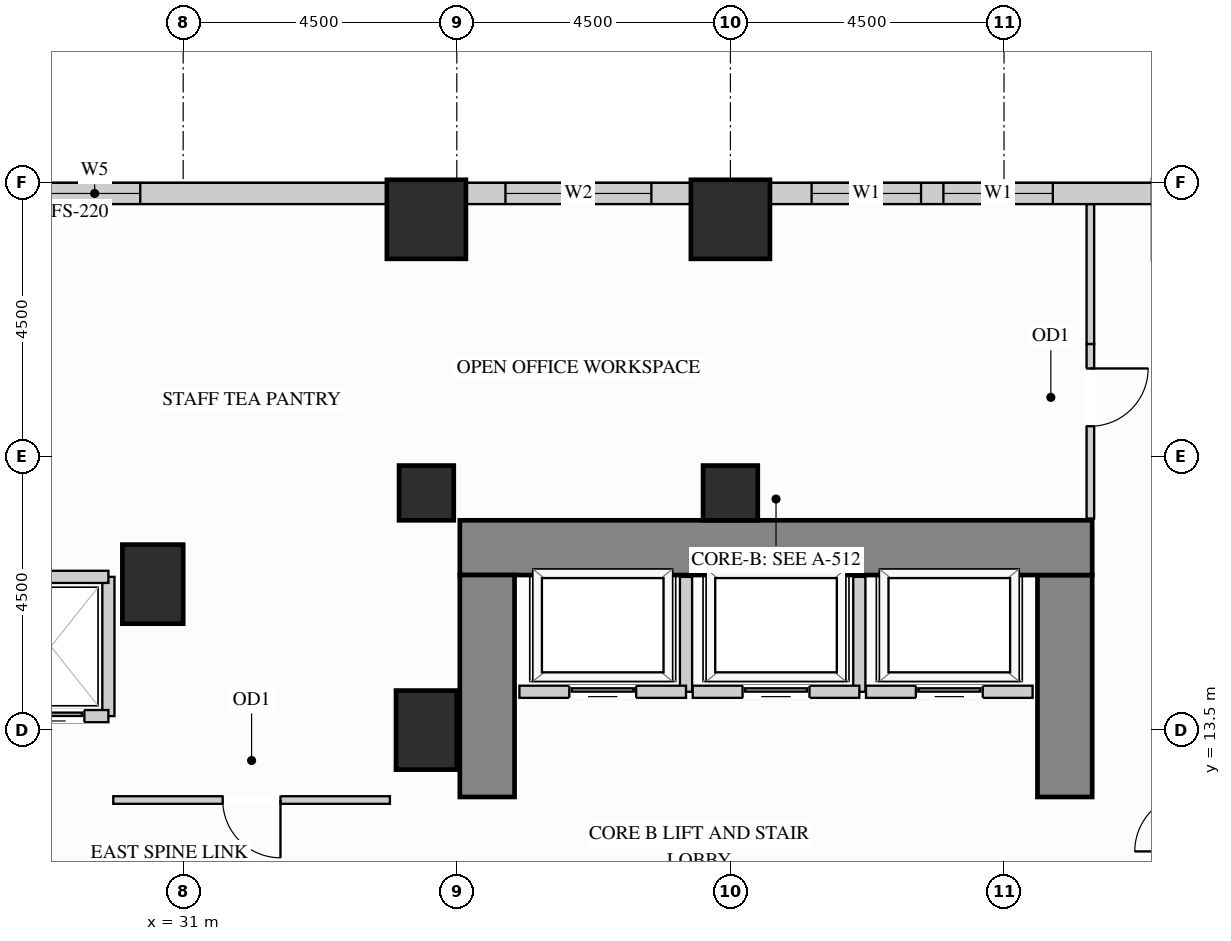
"""IFC4 building model, lengths in metres.
Left out: names, types, materials, properties, quantities, classifications, styles, units other than length and angle.
Written with IfcOpenShell. Run it as: python <this file> out.ifc"""

import sys

from ifc_helpers import new_model, si_unit, direction, frame, frame_2d, origin, origin_2d, place, context, subcontext, project, spatial, rectangle, extrude, source, transform, mapped, element, fill, save


model = new_model("IFC4")
c1 = context("Model", 3, precision=1e-05, world=origin(), true_north=direction((0.0, 1.0)))
c2 = subcontext(c1, "Body", "Model", "MODEL_VIEW")
j1 = project(units=[si_unit("LENGTHUNIT", "METRE"), si_unit("PLANEANGLEUNIT", "RADIAN")], contexts=[c1])
p1 = place(None, origin())
s1 = spatial("IfcSite", under=j1, at=p1, CompositionType="ELEMENT")
p2 = place(p1, origin())
s2 = spatial("IfcBuilding", under=s1, at=p2, CompositionType="ELEMENT")
p3 = place(p2, frame((0.0, 0.0, 44.1)))
s3 = spatial("IfcBuildingStorey", under=s2, at=p3, CompositionType="ELEMENT", Elevation=44.1)
m1 = source(origin(), c2, "Body", "SweptSolid", [
    extrude(rectangle(XDim=0.9, YDim=0.9, at=origin_2d()), origin(), (0.0, 0.0, 1.0), 3.38),
])
for number, where, z_axis, x_axis in (
    (1, (35.0, 17.4, 0.0), (0.0, 0.0, 1.0), (1.0, 0.0, 0.0)),
    (2, (40.0, 17.4, 0.0), (0.0, 0.0, 1.0), (1.0, 0.0, 0.0)),
):
    element("IfcColumn", number, at=place(p3, frame(where, z_axis=z_axis, x_axis=x_axis)), inside=s3, PredefinedType="COLUMN", context=c2, shape_type="MappedRepresentation", body=[
        mapped(m1, transform((0.0, 0.0, 0.0), x_axis=(1.0, 0.0, 0.0), y_axis=(0.0, 1.0, 0.0), z_axis=(0.0, 0.0, 1.0))),
    ])
m2 = source(origin(), c2, "Body", "SweptSolid", [
    extrude(rectangle(XDim=1.0, YDim=1.3, at=origin_2d()), origin(), (0.0, 0.0, 1.0), 3.38),
])
for number, where, z_axis, x_axis in (
    (3, (35.0, 13.5, 0.0), (0.0, 0.0, 1.0), (1.0, 0.0, 0.0)),
    (4, (30.5, 15.9, 0.0), (0.0, 0.0, 1.0), (1.0, 0.0, 0.0)),
):
    element("IfcColumn", number, at=place(p3, frame(where, z_axis=z_axis, x_axis=x_axis)), inside=s3, PredefinedType="COLUMN", context=c2, shape_type="MappedRepresentation", body=[
        mapped(m2, transform((0.0, 0.0, 0.0), x_axis=(1.0, 0.0, 0.0), y_axis=(0.0, 1.0, 0.0), z_axis=(0.0, 0.0, 1.0))),
    ])
m3 = source(origin(), c2, "Body", "SweptSolid", [
    extrude(rectangle(XDim=1.3, YDim=1.3, at=origin_2d()), origin(), (0.0, 0.0, 1.0), 3.38),
])
for number, where, z_axis, x_axis in (
    (5, (35.0, 21.9, 0.0), (0.0, 0.0, 1.0), (1.0, 0.0, 0.0)),
    (6, (40.0, 21.9, 0.0), (0.0, 0.0, 1.0), (1.0, 0.0, 0.0)),
):
    element("IfcColumn", number, at=place(p3, frame(where, z_axis=z_axis, x_axis=x_axis)), inside=s3, PredefinedType="COLUMN", context=c2, shape_type="MappedRepresentation", body=[
        mapped(m3, transform((0.0, 0.0, 0.0), x_axis=(1.0, 0.0, 0.0), y_axis=(0.0, 1.0, 0.0), z_axis=(0.0, 0.0, 1.0))),
    ])
m4 = source(origin(), c2, "Body", "SweptSolid", [
    extrude(rectangle(XDim=3.65, YDim=0.9, at=frame_2d((1.825, 0.0))), origin(), (0.0, 0.0, 1.0), 3.38),
])
p4 = place(p3, frame((45.5, 12.4, 0.0), z_axis=(0.0, 0.0, 1.0), x_axis=(0.0, 1.0, 0.0)))
e7 = element("IfcWall", 7, at=p4, inside=s3, PredefinedType="SHEAR", context=c2, shape_type="MappedRepresentation", body=[
    mapped(m4, transform((0.0, 0.0, 0.0), x_axis=(1.0, 0.0, 0.0), y_axis=(0.0, 1.0, 0.0), z_axis=(0.0, 0.0, 1.0))),
])
m5 = source(origin(), c2, "Body", "SweptSolid", [
    extrude(rectangle(XDim=10.4, YDim=0.9, at=frame_2d((5.2, 0.0))), origin(), (0.0, 0.0, 1.0), 3.38),
])
p5 = place(p3, frame((35.55, 16.5, 0.0), z_axis=(0.0, 0.0, 1.0), x_axis=(1.0, 0.0, 0.0)))
e8 = element("IfcWall", 8, at=p5, inside=s3, PredefinedType="SHEAR", context=c2, shape_type="MappedRepresentation", body=[
    mapped(m5, transform((0.0, 0.0, 0.0), x_axis=(1.0, 0.0, 0.0), y_axis=(0.0, 1.0, 0.0), z_axis=(0.0, 0.0, 1.0))),
])
p6 = place(p3, frame((36.0, 12.4, 0.0), z_axis=(0.0, 0.0, 1.0), x_axis=(0.0, 1.0, 0.0)))
e9 = element("IfcWall", 9, at=p6, inside=s3, PredefinedType="SHEAR", context=c2, shape_type="MappedRepresentation", body=[
    mapped(m4, transform((0.0, 0.0, 0.0), x_axis=(1.0, 0.0, 0.0), y_axis=(0.0, 1.0, 0.0), z_axis=(0.0, 0.0, 1.0))),
])
p7 = place(p3, frame((46.952, 22.325, 0.0), z_axis=(0.0, 0.0, 1.0), x_axis=(-1.0, 0.0, 0.0)))
e10 = element("IfcWall", 10, at=p7, inside=s3, PredefinedType="SOLIDWALL", context=c2, shape_type="SweptSolid", body=[
    extrude(rectangle(XDim=6.304, YDim=0.35, at=frame_2d((3.152, 0.0))), origin(), (0.0, 0.0, 1.0), 2.51),
])
p8 = place(p7, frame((1.649, 0.0, 0.78)))
e11 = element("IfcOpeningElement", 11, at=p8, cuts=e10, PredefinedType="OPENING", context=c2, shape_type="SweptSolid", body=[
    extrude(rectangle(XDim=1.8, YDim=1.55, at=frame_2d((0.9, 0.775))), frame((0.0, 0.185, 0.0), z_axis=(0.0, -1.0, 0.0), x_axis=(1.0, 0.0, 0.0)), (0.0, 0.0, 1.0), 0.37),
])
p9 = place(p7, frame((3.817, 0.0, 0.78)))
e12 = element("IfcOpeningElement", 12, at=p9, cuts=e10, PredefinedType="OPENING", context=c2, shape_type="SweptSolid", body=[
    extrude(rectangle(XDim=1.8, YDim=1.55, at=frame_2d((0.9, 0.775))), frame((0.0, 0.185, 0.0), z_axis=(0.0, -1.0, 0.0), x_axis=(1.0, 0.0, 0.0)), (0.0, 0.0, 1.0), 0.37),
])
p10 = place(p3, frame((39.352, 22.325, 0.0), z_axis=(0.0, 0.0, 1.0), x_axis=(-1.0, 0.0, 0.0)))
e13 = element("IfcWall", 13, at=p10, inside=s3, PredefinedType="SOLIDWALL", context=c2, shape_type="SweptSolid", body=[
    extrude(rectangle(XDim=3.704, YDim=0.35, at=frame_2d((1.852, 0.0))), origin(), (0.0, 0.0, 1.0), 2.51),
])
p11 = place(p10, frame((0.652, 0.0, 0.78)))
e14 = element("IfcOpeningElement", 14, at=p11, cuts=e13, PredefinedType="OPENING", context=c2, shape_type="SweptSolid", body=[
    extrude(rectangle(XDim=2.4, YDim=1.55, at=frame_2d((1.2, 0.775))), frame((0.0, 0.185, 0.0), z_axis=(0.0, -1.0, 0.0), x_axis=(1.0, 0.0, 0.0)), (0.0, 0.0, 1.0), 0.37),
])
p12 = place(p3, frame((34.352, 22.325, 0.0), z_axis=(0.0, 0.0, 1.0), x_axis=(-1.0, 0.0, 0.0)))
e15 = element("IfcWall", 15, at=p12, inside=s3, PredefinedType="SOLIDWALL", context=c2, shape_type="SweptSolid", body=[
    extrude(rectangle(XDim=14.854, YDim=0.35, at=frame_2d((7.427, 0.0))), origin(), (0.0, 0.0, 1.0), 3.365),
])
p13 = place(p12, frame((4.058, 0.0, 0.78)))
e16 = element("IfcOpeningElement", 16, at=p13, cuts=e15, PredefinedType="OPENING", context=c2, shape_type="SweptSolid", body=[
    extrude(rectangle(XDim=1.5, YDim=2.0, at=frame_2d((0.75, 1.0))), frame((0.0, 0.185, 0.0), z_axis=(0.0, -1.0, 0.0), x_axis=(1.0, 0.0, 0.0)), (0.0, 0.0, 1.0), 0.37),
])
p14 = place(p12, frame((9.296, 0.0, 0.78)))
e17 = element("IfcOpeningElement", 17, at=p14, cuts=e15, PredefinedType="OPENING", context=c2, shape_type="SweptSolid", body=[
    extrude(rectangle(XDim=1.5, YDim=2.0, at=frame_2d((0.75, 1.0))), frame((0.0, 0.185, 0.0), z_axis=(0.0, -1.0, 0.0), x_axis=(1.0, 0.0, 0.0)), (0.0, 0.0, 1.0), 0.37),
])
p15 = place(p3, frame((45.92, 16.98, 0.0), z_axis=(0.0, 0.0, 1.0), x_axis=(0.0, 1.0, 0.0)))
e18 = element("IfcWall", 18, at=p15, inside=s3, PredefinedType="PARTITIONING", context=c2, shape_type="SweptSolid", body=[
    extrude(rectangle(XDim=2.87, YDim=0.125, at=frame_2d((1.435, 0.0))), origin(), (0.0, 0.0, 1.0), 3.365),
])
p16 = place(p15, frame((1.517, 0.0, 0.0)))
e19 = element("IfcOpeningElement", 19, at=p16, cuts=e18, PredefinedType="OPENING", context=c2, shape_type="SweptSolid", body=[
    extrude(rectangle(XDim=0.95, YDim=2.15, at=frame_2d((0.475, 1.075))), frame((0.0, 0.073, 0.0), z_axis=(0.0, -1.0, 0.0), x_axis=(1.0, 0.0, 0.0)), (0.0, 0.0, 1.0), 0.145),
])
m6 = source(origin(), c2, "Body", "SweptSolid", [
    extrude(rectangle(XDim=2.298, YDim=0.125, at=frame_2d((1.149, 0.0))), origin(), (0.0, 0.0, 1.0), 3.365),
])
p17 = place(p3, frame((45.92, 19.85, 0.0), z_axis=(0.0, 0.0, 1.0), x_axis=(0.0, 1.0, 0.0)))
e20 = element("IfcWall", 20, at=p17, inside=s3, PredefinedType="PARTITIONING", context=c2, shape_type="MappedRepresentation", body=[
    mapped(m6, transform((0.0, 0.0, 0.0), x_axis=(1.0, 0.0, 0.0), y_axis=(0.0, 1.0, 0.0), z_axis=(0.0, 0.0, 1.0))),
])
p18 = place(p3, frame((29.85, 12.35, 0.0), z_axis=(0.0, 0.0, 1.0), x_axis=(1.0, 0.0, 0.0)))
e21 = element("IfcWall", 21, at=p18, inside=s3, PredefinedType="PARTITIONING", context=c2, shape_type="SweptSolid", body=[
    extrude(rectangle(XDim=4.55, YDim=0.125, at=frame_2d((2.275, 0.0))), origin(), (0.0, 0.0, 1.0), 3.365),
])
p19 = place(p18, frame((1.8, 0.0, 0.0)))
e22 = element("IfcOpeningElement", 22, at=p19, cuts=e21, PredefinedType="OPENING", context=c2, shape_type="SweptSolid", body=[
    extrude(rectangle(XDim=0.95, YDim=2.15, at=frame_2d((0.475, 1.075))), frame((0.0, 0.073, 0.0), z_axis=(0.0, -1.0, 0.0), x_axis=(1.0, 0.0, 0.0)), (0.0, 0.0, 1.0), 0.145),
])
m7 = source(origin(), c2, "Body", "SweptSolid", [
    extrude(rectangle(XDim=1.89, YDim=0.2, at=frame_2d((0.945, 0.0))), origin(), (0.0, 0.0, 1.0), 3.365),
])
p20 = place(p3, frame((39.27, 14.13, 0.0), z_axis=(0.0, 0.0, 1.0), x_axis=(0.0, 1.0, 0.0)))
e23 = element("IfcWall", 23, at=p20, inside=s3, PredefinedType="PARTITIONING", context=c2, shape_type="MappedRepresentation", body=[
    mapped(m7, transform((0.0, 0.0, 0.0), x_axis=(1.0, 0.0, 0.0), y_axis=(0.0, 1.0, 0.0), z_axis=(0.0, 0.0, 1.0))),
])
p21 = place(p3, frame((36.53, 14.13, 0.0), z_axis=(0.0, 0.0, 1.0), x_axis=(1.0, 0.0, 0.0)))
e24 = element("IfcWall", 24, at=p21, inside=s3, PredefinedType="PARTITIONING", context=c2, shape_type="SweptSolid", body=[
    extrude(rectangle(XDim=2.74, YDim=0.2, at=frame_2d((1.37, 0.0))), origin(), (0.0, 0.0, 1.0), 3.365),
])
p22 = place(p21, frame((0.82, 0.0, 0.0)))
e25 = element("IfcOpeningElement", 25, at=p22, cuts=e24, PredefinedType="OPENING", context=c2, shape_type="SweptSolid", body=[
    extrude(rectangle(XDim=1.1, YDim=2.2, at=frame_2d((0.55, 1.1))), frame((0.0, 0.11, 0.0), z_axis=(0.0, -1.0, 0.0), x_axis=(1.0, 0.0, 0.0)), (0.0, 0.0, 1.0), 0.22),
])
p23 = place(p3, frame((42.12, 14.13, 0.0), z_axis=(0.0, 0.0, 1.0), x_axis=(0.0, 1.0, 0.0)))
e26 = element("IfcWall", 26, at=p23, inside=s3, PredefinedType="PARTITIONING", context=c2, shape_type="MappedRepresentation", body=[
    mapped(m7, transform((0.0, 0.0, 0.0), x_axis=(1.0, 0.0, 0.0), y_axis=(0.0, 1.0, 0.0), z_axis=(0.0, 0.0, 1.0))),
])
p24 = place(p3, frame((39.38, 14.13, 0.0), z_axis=(0.0, 0.0, 1.0), x_axis=(1.0, 0.0, 0.0)))
e27 = element("IfcWall", 27, at=p24, inside=s3, PredefinedType="PARTITIONING", context=c2, shape_type="SweptSolid", body=[
    extrude(rectangle(XDim=2.74, YDim=0.2, at=frame_2d((1.37, 0.0))), origin(), (0.0, 0.0, 1.0), 3.365),
])
p25 = place(p24, frame((0.82, 0.0, 0.0)))
e28 = element("IfcOpeningElement", 28, at=p25, cuts=e27, PredefinedType="OPENING", context=c2, shape_type="SweptSolid", body=[
    extrude(rectangle(XDim=1.1, YDim=2.2, at=frame_2d((0.55, 1.1))), frame((0.0, 0.11, 0.0), z_axis=(0.0, -1.0, 0.0), x_axis=(1.0, 0.0, 0.0)), (0.0, 0.0, 1.0), 0.22),
])
p26 = place(p3, frame((42.23, 14.13, 0.0), z_axis=(0.0, 0.0, 1.0), x_axis=(1.0, 0.0, 0.0)))
e29 = element("IfcWall", 29, at=p26, inside=s3, PredefinedType="PARTITIONING", context=c2, shape_type="SweptSolid", body=[
    extrude(rectangle(XDim=2.74, YDim=0.2, at=frame_2d((1.37, 0.0))), origin(), (0.0, 0.0, 1.0), 3.365),
])
p27 = place(p26, frame((0.82, 0.0, 0.0)))
e30 = element("IfcOpeningElement", 30, at=p27, cuts=e29, PredefinedType="OPENING", context=c2, shape_type="SweptSolid", body=[
    extrude(rectangle(XDim=1.1, YDim=2.2, at=frame_2d((0.55, 1.1))), frame((0.0, 0.11, 0.0), z_axis=(0.0, -1.0, 0.0), x_axis=(1.0, 0.0, 0.0)), (0.0, 0.0, 1.0), 0.22),
])
m8 = source(origin(), c2, "Body", "SweptSolid", [
    extrude(rectangle(XDim=2.29, YDim=0.2, at=frame_2d((1.145, 0.0))), origin(), (0.0, 0.0, 1.0), 3.365),
])
p28 = place(p3, frame((29.77, 13.73, 0.0), z_axis=(0.0, 0.0, 1.0), x_axis=(0.0, 1.0, 0.0)))
e31 = element("IfcWall", 31, at=p28, inside=s3, PredefinedType="PARTITIONING", context=c2, shape_type="MappedRepresentation", body=[
    mapped(m8, transform((0.0, 0.0, 0.0), x_axis=(1.0, 0.0, 0.0), y_axis=(0.0, 1.0, 0.0), z_axis=(0.0, 0.0, 1.0))),
])
m9 = source(origin(), c2, "Body", "SweptSolid", [
    extrude(rectangle(XDim=1.89, YDim=0.2, at=frame_2d((0.945, 0.0))), origin(), (0.0, 0.0, 1.0), 2.67),
])
p29 = place(p3, frame((27.88, 16.02, 0.0), z_axis=(0.0, 0.0, 1.0), x_axis=(1.0, 0.0, 0.0)))
e32 = element("IfcWall", 32, at=p29, inside=s3, PredefinedType="PARTITIONING", context=c2, shape_type="MappedRepresentation", body=[
    mapped(m9, transform((0.0, 0.0, 0.0), x_axis=(1.0, 0.0, 0.0), y_axis=(0.0, 1.0, 0.0), z_axis=(0.0, 0.0, 1.0))),
])
p30 = place(p3, frame((27.88, 13.73, 0.0), z_axis=(0.0, 0.0, 1.0), x_axis=(1.0, 0.0, 0.0)))
e33 = element("IfcWall", 33, at=p30, inside=s3, PredefinedType="PARTITIONING", context=c2, shape_type="SweptSolid", body=[
    extrude(rectangle(XDim=1.89, YDim=0.2, at=frame_2d((0.945, 0.0))), origin(), (0.0, 0.0, 1.0), 2.446),
])
p31 = place(p30, frame((0.395, 0.0, 0.0)))
e34 = element("IfcOpeningElement", 34, at=p31, cuts=e33, PredefinedType="OPENING", context=c2, shape_type="SweptSolid", body=[
    extrude(rectangle(XDim=1.1, YDim=2.2, at=frame_2d((0.55, 1.1))), frame((0.0, 0.11, 0.0), z_axis=(0.0, -1.0, 0.0), x_axis=(1.0, 0.0, 0.0)), (0.0, 0.0, 1.0), 0.22),
])
m10 = source(origin(), c2, "Body", "SweptSolid", [
    extrude(rectangle(XDim=1.1, YDim=2.2, at=frame_2d((0.55, 1.1))), frame((0.0, 0.025, 0.0), z_axis=(0.0, -1.0, 0.0), x_axis=(1.0, 0.0, 0.0)), (0.0, 0.0, 1.0), 0.05),
])
p32 = place(p22, origin())
e35 = element("IfcDoor", 35, at=p32, inside=s3, OperationType="SLIDING_TO_LEFT", PredefinedType="DOOR", context=c2, shape_type="MappedRepresentation", body=[
    mapped(m10, transform((0.0, 0.0, 0.0), x_axis=(1.0, 0.0, 0.0), y_axis=(0.0, 1.0, 0.0), z_axis=(0.0, 0.0, 1.0))),
])
fill(e25, e35)
p33 = place(p25, origin())
e36 = element("IfcDoor", 36, at=p33, inside=s3, OperationType="SLIDING_TO_LEFT", PredefinedType="DOOR", context=c2, shape_type="MappedRepresentation", body=[
    mapped(m10, transform((0.0, 0.0, 0.0), x_axis=(1.0, 0.0, 0.0), y_axis=(0.0, 1.0, 0.0), z_axis=(0.0, 0.0, 1.0))),
])
fill(e28, e36)
p34 = place(p27, origin())
e37 = element("IfcDoor", 37, at=p34, inside=s3, OperationType="SLIDING_TO_LEFT", PredefinedType="DOOR", context=c2, shape_type="MappedRepresentation", body=[
    mapped(m10, transform((0.0, 0.0, 0.0), x_axis=(1.0, 0.0, 0.0), y_axis=(0.0, 1.0, 0.0), z_axis=(0.0, 0.0, 1.0))),
])
fill(e30, e37)
p35 = place(p31, origin())
e38 = element("IfcDoor", 38, at=p35, inside=s3, OperationType="SLIDING_TO_LEFT", PredefinedType="DOOR", context=c2, shape_type="MappedRepresentation", body=[
    mapped(m10, transform((0.0, 0.0, 0.0), x_axis=(1.0, 0.0, 0.0), y_axis=(0.0, 1.0, 0.0), z_axis=(0.0, 0.0, 1.0))),
])
fill(e34, e38)
m11 = source(origin(), c2, "Body", "SweptSolid", [
    extrude(rectangle(XDim=0.95, YDim=2.15, at=frame_2d((0.475, 1.075))), frame((0.0, 0.025, 0.0), z_axis=(0.0, -1.0, 0.0), x_axis=(1.0, 0.0, 0.0)), (0.0, 0.0, 1.0), 0.05),
])
p36 = place(p16, origin())
e39 = element("IfcDoor", 39, at=p36, inside=s3, OperationType="SINGLE_SWING_RIGHT", PredefinedType="DOOR", context=c2, shape_type="MappedRepresentation", body=[
    mapped(m11, transform((0.0, 0.0, 0.0), x_axis=(1.0, 0.0, 0.0), y_axis=(0.0, 1.0, 0.0), z_axis=(0.0, 0.0, 1.0))),
])
fill(e19, e39)
p37 = place(p19, origin())
e40 = element("IfcDoor", 40, at=p37, inside=s3, OperationType="SINGLE_SWING_RIGHT", PredefinedType="DOOR", context=c2, shape_type="MappedRepresentation", body=[
    mapped(m11, transform((0.0, 0.0, 0.0), x_axis=(1.0, 0.0, 0.0), y_axis=(0.0, 1.0, 0.0), z_axis=(0.0, 0.0, 1.0))),
])
fill(e22, e40)
m12 = source(origin(), c2, "Body", "SweptSolid", [
    extrude(rectangle(XDim=1.8, YDim=1.55, at=frame_2d((0.9, 0.775))), frame((0.0, 0.03, 0.0), z_axis=(0.0, -1.0, 0.0), x_axis=(1.0, 0.0, 0.0)), (0.0, 0.0, 1.0), 0.06),
])
p38 = place(p8, origin())
e41 = element("IfcWindow", 41, at=p38, inside=s3, PartitioningType="SINGLE_PANEL", PredefinedType="WINDOW", context=c2, shape_type="MappedRepresentation", body=[
    mapped(m12, transform((0.0, 0.0, 0.0), x_axis=(1.0, 0.0, 0.0), y_axis=(0.0, 1.0, 0.0), z_axis=(0.0, 0.0, 1.0))),
])
fill(e11, e41)
p39 = place(p9, origin())
e42 = element("IfcWindow", 42, at=p39, inside=s3, PartitioningType="SINGLE_PANEL", PredefinedType="WINDOW", context=c2, shape_type="MappedRepresentation", body=[
    mapped(m12, transform((0.0, 0.0, 0.0), x_axis=(1.0, 0.0, 0.0), y_axis=(0.0, 1.0, 0.0), z_axis=(0.0, 0.0, 1.0))),
])
fill(e12, e42)
m13 = source(origin(), c2, "Body", "SweptSolid", [
    extrude(rectangle(XDim=2.4, YDim=1.55, at=frame_2d((1.2, 0.775))), frame((0.0, 0.03, 0.0), z_axis=(0.0, -1.0, 0.0), x_axis=(1.0, 0.0, 0.0)), (0.0, 0.0, 1.0), 0.06),
])
p40 = place(p11, origin())
e43 = element("IfcWindow", 43, at=p40, inside=s3, PartitioningType="SINGLE_PANEL", PredefinedType="WINDOW", context=c2, shape_type="MappedRepresentation", body=[
    mapped(m13, transform((0.0, 0.0, 0.0), x_axis=(1.0, 0.0, 0.0), y_axis=(0.0, 1.0, 0.0), z_axis=(0.0, 0.0, 1.0))),
])
fill(e14, e43)
m14 = source(origin(), c2, "Body", "SweptSolid", [
    extrude(rectangle(XDim=1.5, YDim=2.0, at=frame_2d((0.75, 1.0))), frame((0.0, 0.03, 0.0), z_axis=(0.0, -1.0, 0.0), x_axis=(1.0, 0.0, 0.0)), (0.0, 0.0, 1.0), 0.06),
])
p41 = place(p13, origin())
e44 = element("IfcWindow", 44, at=p41, inside=s3, PartitioningType="SINGLE_PANEL", PredefinedType="WINDOW", context=c2, shape_type="MappedRepresentation", body=[
    mapped(m14, transform((0.0, 0.0, 0.0), x_axis=(1.0, 0.0, 0.0), y_axis=(0.0, 1.0, 0.0), z_axis=(0.0, 0.0, 1.0))),
])
fill(e16, e44)
save(model, sys.argv[1])
